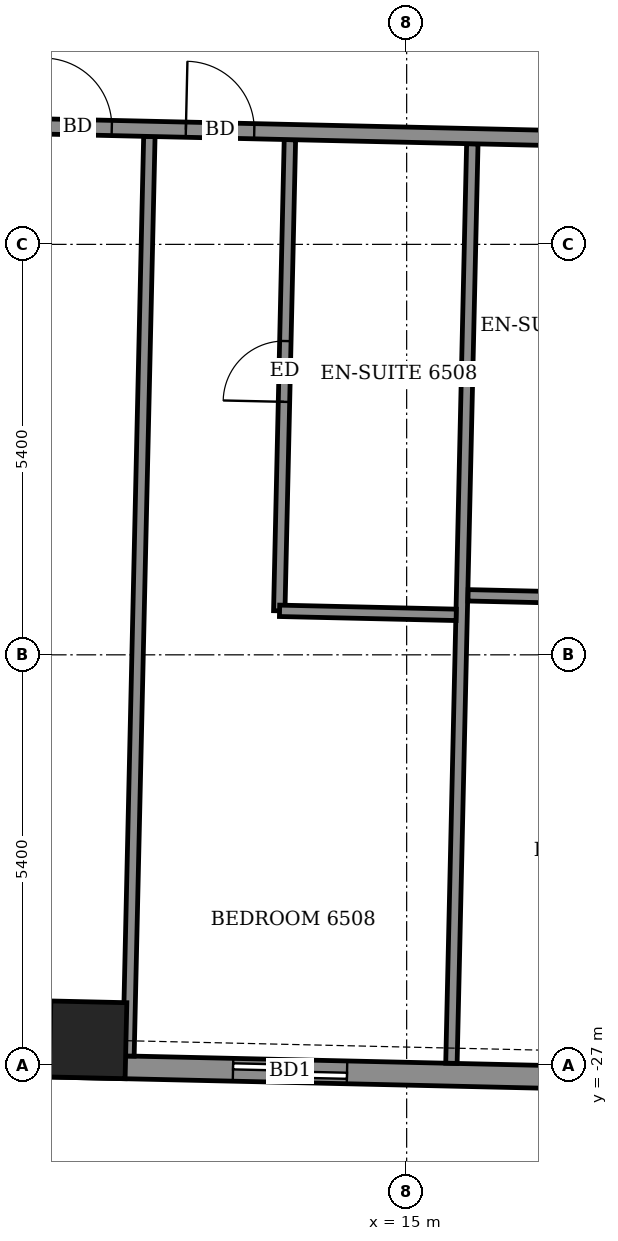
"""IFC4 building model, lengths in metres.
Left out: names, types, materials, properties, quantities, classifications, styles, units other than length and angle.
Written with IfcOpenShell. Run it as: python <this file> out.ifc"""

import sys

from ifc_helpers import new_model, si_unit, direction, frame, frame_2d, origin, origin_2d, place, context, subcontext, project, spatial, rectangle, extrude, element, fill, save


model = new_model("IFC4")
c1 = context("Model", 3, precision=1e-05, world=origin(), true_north=direction((0.0, 1.0)))
c2 = subcontext(c1, "Body", "Model", "MODEL_VIEW")
j1 = project(units=[si_unit("LENGTHUNIT", "METRE"), si_unit("PLANEANGLEUNIT", "RADIAN")], contexts=[c1])
p1 = place(None, origin())
s1 = spatial("IfcSite", under=j1, at=p1, CompositionType="ELEMENT")
p2 = place(p1, origin())
s2 = spatial("IfcBuilding", under=s1, at=p2, CompositionType="ELEMENT")
p3 = place(p2, frame((0.0, 0.0, 257.3)))
s3 = spatial("IfcBuildingStorey", under=s2, at=p3, CompositionType="ELEMENT", Elevation=257.3)
p4 = place(p3, frame((10.807, -26.665, -0.55), z_axis=(0.0, 0.0, 1.0), x_axis=(0.999742139886, -0.022708010396, 0.0)))
e1 = element("IfcColumn", 1, at=p4, inside=s3, PredefinedType="COLUMN", context=c2, shape_type="SweptSolid", body=[
    extrude(rectangle(XDim=1.0, YDim=1.0, at=origin_2d()), origin(), (0.0, 0.0, 1.0), 3.6),
])
p5 = place(p3, frame((-22.95, -26.249, 0.0), z_axis=(0.0, 0.0, 1.0), x_axis=(0.999742196137, -0.022705533743, 0.0)))
e2 = element("IfcWall", 2, at=p5, inside=s3, PredefinedType="SOLIDWALL", context=c2, shape_type="SweptSolid", body=[
    extrude(rectangle(XDim=47.171, YDim=0.3, at=frame_2d((23.585, 0.0))), origin(), (0.0, 0.0, 1.0), 2.55),
])
p6 = place(p5, frame((1.676, 0.0, 0.0)))
e3 = element("IfcOpeningElement", 3, at=p6, cuts=e2, PredefinedType="OPENING", context=c2, shape_type="SweptSolid", body=[
    extrude(rectangle(XDim=1.5, YDim=2.4, at=frame_2d((0.75, 1.2))), frame((0.0, 0.16, 0.0), z_axis=(0.0, -1.0, 0.0), x_axis=(1.0, 0.0, 0.0)), (0.0, 0.0, 1.0), 0.32),
])
p7 = place(p5, frame((4.741, 0.0, 0.0)))
e4 = element("IfcOpeningElement", 4, at=p7, cuts=e2, PredefinedType="OPENING", context=c2, shape_type="SweptSolid", body=[
    extrude(rectangle(XDim=1.2, YDim=2.4, at=frame_2d((0.6, 1.2))), frame((0.0, 0.16, 0.0), z_axis=(0.0, -1.0, 0.0), x_axis=(1.0, 0.0, 0.0)), (0.0, 0.0, 1.0), 0.32),
])
p8 = place(p5, frame((9.9, 0.0, 0.0)))
e5 = element("IfcOpeningElement", 5, at=p8, cuts=e2, PredefinedType="OPENING", context=c2, shape_type="SweptSolid", body=[
    extrude(rectangle(XDim=1.5, YDim=2.4, at=frame_2d((0.75, 1.2))), frame((0.0, 0.16, 0.0), z_axis=(0.0, -1.0, 0.0), x_axis=(1.0, 0.0, 0.0)), (0.0, 0.0, 1.0), 0.32),
])
p9 = place(p5, frame((14.632, 0.0, 0.0)))
e6 = element("IfcOpeningElement", 6, at=p9, cuts=e2, PredefinedType="OPENING", context=c2, shape_type="SweptSolid", body=[
    extrude(rectangle(XDim=1.5, YDim=2.4, at=frame_2d((0.75, 1.2))), frame((0.0, 0.16, 0.0), z_axis=(0.0, -1.0, 0.0), x_axis=(1.0, 0.0, 0.0)), (0.0, 0.0, 1.0), 0.32),
])
p10 = place(p5, frame((17.773, 0.0, 0.0)))
e7 = element("IfcOpeningElement", 7, at=p10, cuts=e2, PredefinedType="OPENING", context=c2, shape_type="SweptSolid", body=[
    extrude(rectangle(XDim=1.5, YDim=2.4, at=frame_2d((0.75, 1.2))), frame((0.0, 0.16, 0.0), z_axis=(0.0, -1.0, 0.0), x_axis=(1.0, 0.0, 0.0)), (0.0, 0.0, 1.0), 0.32),
])
p11 = place(p5, frame((22.825, 0.0, 0.0)))
e8 = element("IfcOpeningElement", 8, at=p11, cuts=e2, PredefinedType="OPENING", context=c2, shape_type="SweptSolid", body=[
    extrude(rectangle(XDim=1.5, YDim=2.4, at=frame_2d((0.75, 1.2))), frame((0.0, 0.16, 0.0), z_axis=(0.0, -1.0, 0.0), x_axis=(1.0, 0.0, 0.0)), (0.0, 0.0, 1.0), 0.32),
])
p12 = place(p5, frame((27.863, 0.0, 0.0)))
e9 = element("IfcOpeningElement", 9, at=p12, cuts=e2, PredefinedType="OPENING", context=c2, shape_type="SweptSolid", body=[
    extrude(rectangle(XDim=1.5, YDim=2.4, at=frame_2d((0.75, 1.2))), frame((0.0, 0.16, 0.0), z_axis=(0.0, -1.0, 0.0), x_axis=(1.0, 0.0, 0.0)), (0.0, 0.0, 1.0), 0.32),
])
p13 = place(p5, frame((31.004, 0.0, 0.0)))
e10 = element("IfcOpeningElement", 10, at=p13, cuts=e2, PredefinedType="OPENING", context=c2, shape_type="SweptSolid", body=[
    extrude(rectangle(XDim=1.5, YDim=2.4, at=frame_2d((0.75, 1.2))), frame((0.0, 0.16, 0.0), z_axis=(0.0, -1.0, 0.0), x_axis=(1.0, 0.0, 0.0)), (0.0, 0.0, 1.0), 0.32),
])
p14 = place(p5, frame((35.675, 0.0, 0.0)))
e11 = element("IfcOpeningElement", 11, at=p14, cuts=e2, PredefinedType="OPENING", context=c2, shape_type="SweptSolid", body=[
    extrude(rectangle(XDim=1.5, YDim=2.4, at=frame_2d((0.75, 1.2))), frame((0.0, 0.16, 0.0), z_axis=(0.0, -1.0, 0.0), x_axis=(1.0, 0.0, 0.0)), (0.0, 0.0, 1.0), 0.32),
])
p15 = place(p5, frame((41.17, 0.0, 0.0)))
e12 = element("IfcOpeningElement", 12, at=p15, cuts=e2, PredefinedType="OPENING", context=c2, shape_type="SweptSolid", body=[
    extrude(rectangle(XDim=1.2, YDim=2.4, at=frame_2d((0.6, 1.2))), frame((0.0, 0.16, 0.0), z_axis=(0.0, -1.0, 0.0), x_axis=(1.0, 0.0, 0.0)), (0.0, 0.0, 1.0), 0.32),
])
p16 = place(p5, frame((43.438, 0.0, 0.9)))
e13 = element("IfcOpeningElement", 13, at=p16, cuts=e2, PredefinedType="OPENING", context=c2, shape_type="SweptSolid", body=[
    extrude(rectangle(XDim=2.4, YDim=1.5, at=frame_2d((1.2, 0.75))), frame((0.0, 0.16, 0.0), z_axis=(0.0, -1.0, 0.0), x_axis=(1.0, 0.0, 0.0)), (0.0, 0.0, 1.0), 0.32),
])
p17 = place(p3, frame((11.34, -26.878, 0.0), z_axis=(0.0, 0.0, 1.0), x_axis=(0.022719113715, 0.999741887625, 0.0)))
e14 = element("IfcWall", 14, at=p17, inside=s3, PredefinedType="PARTITIONING", context=c2, shape_type="SweptSolid", body=[
    extrude(rectangle(XDim=12.1, YDim=0.15, at=frame_2d((6.05, 0.0))), origin(), (0.0, 0.0, 1.0), 2.55),
])
p18 = place(p3, frame((15.589, -26.974, 0.0), z_axis=(0.0, 0.0, 1.0), x_axis=(0.022718655443, 0.999741898039, 0.0)))
e15 = element("IfcWall", 15, at=p18, inside=s3, PredefinedType="PARTITIONING", context=c2, shape_type="SweptSolid", body=[
    extrude(rectangle(XDim=12.1, YDim=0.15, at=frame_2d((6.05, 0.0))), origin(), (0.0, 0.0, 1.0), 2.55),
])
p19 = place(p3, frame((13.324, -21.021, 0.0), z_axis=(0.0, 0.0, 1.0), x_axis=(0.022604220207, 0.999744491972, 0.0)))
e16 = element("IfcWall", 16, at=p19, inside=s3, PredefinedType="PARTITIONING", context=c2, shape_type="SweptSolid", body=[
    extrude(rectangle(XDim=6.199, YDim=0.15, at=frame_2d((3.1, 0.0))), origin(), (0.0, 0.0, 1.0), 3.05),
])
p20 = place(p19, frame((2.75, 0.0, 0.0)))
e17 = element("IfcOpeningElement", 17, at=p20, cuts=e16, PredefinedType="OPENING", context=c2, shape_type="SweptSolid", body=[
    extrude(rectangle(XDim=0.8, YDim=2.1, at=frame_2d((0.4, 1.05))), frame((0.0, 0.085, 0.0), z_axis=(0.0, -1.0, 0.0), x_axis=(1.0, 0.0, 0.0)), (0.0, 0.0, 1.0), 0.17),
])
p21 = place(p3, frame((13.328, -21.021, 0.0), z_axis=(0.0, 0.0, 1.0), x_axis=(0.99974031529, -0.022788198363, 0.0)))
e18 = element("IfcWall", 18, at=p21, inside=s3, PredefinedType="PARTITIONING", context=c2, shape_type="SweptSolid", body=[
    extrude(rectangle(XDim=2.325, YDim=0.15, at=frame_2d((1.162, 0.0))), origin(), (0.0, 0.0, 1.0), 3.05),
])
p22 = place(p3, frame((15.808, -20.817, 0.0), z_axis=(0.0, 0.0, 1.0), x_axis=(0.999737862264, -0.022895561926, 0.0)))
e19 = element("IfcWall", 19, at=p22, inside=s3, PredefinedType="PARTITIONING", context=c2, shape_type="SweptSolid", body=[
    extrude(rectangle(XDim=2.324, YDim=0.15, at=frame_2d((1.162, 0.0))), origin(), (0.0, 0.0, 1.0), 3.05),
])
p23 = place(p3, frame((-25.12, -13.847, 0.0), z_axis=(0.0, 0.0, 1.0), x_axis=(0.999742852445, -0.022676617578, 0.0)))
e20 = element("IfcWall", 20, at=p23, inside=s3, PredefinedType="PARTITIONING", context=c2, shape_type="SweptSolid", body=[
    extrude(rectangle(XDim=52.873, YDim=0.2, at=frame_2d((26.437, 0.0))), origin(), (0.0, 0.0, 1.0), 3.05),
])
p24 = place(p23, frame((0.725, 0.0, 0.0)))
e21 = element("IfcOpeningElement", 21, at=p24, cuts=e20, PredefinedType="OPENING", context=c2, shape_type="SweptSolid", body=[
    extrude(rectangle(XDim=1.0, YDim=2.1, at=frame_2d((0.5, 1.05))), frame((0.0, 0.11, 0.0), z_axis=(0.0, -1.0, 0.0), x_axis=(1.0, 0.0, 0.0)), (0.0, 0.0, 1.0), 0.22),
])
p25 = place(p23, frame((5.1, 0.0, 0.0)))
e22 = element("IfcOpeningElement", 22, at=p25, cuts=e20, PredefinedType="OPENING", context=c2, shape_type="SweptSolid", body=[
    extrude(rectangle(XDim=0.9, YDim=2.1, at=frame_2d((0.45, 1.05))), frame((0.0, 0.11, 0.0), z_axis=(0.0, -1.0, 0.0), x_axis=(1.0, 0.0, 0.0)), (0.0, 0.0, 1.0), 0.22),
])
p26 = place(p23, frame((9.6, 0.0, 0.0)))
e23 = element("IfcOpeningElement", 23, at=p26, cuts=e20, PredefinedType="OPENING", context=c2, shape_type="SweptSolid", body=[
    extrude(rectangle(XDim=0.9, YDim=2.1, at=frame_2d((0.45, 1.05))), frame((0.0, 0.11, 0.0), z_axis=(0.0, -1.0, 0.0), x_axis=(1.0, 0.0, 0.0)), (0.0, 0.0, 1.0), 0.22),
])
p27 = place(p23, frame((11.45, 0.0, 0.0)))
e24 = element("IfcOpeningElement", 24, at=p27, cuts=e20, PredefinedType="OPENING", context=c2, shape_type="SweptSolid", body=[
    extrude(rectangle(XDim=0.9, YDim=2.1, at=frame_2d((0.45, 1.05))), frame((0.0, 0.11, 0.0), z_axis=(0.0, -1.0, 0.0), x_axis=(1.0, 0.0, 0.0)), (0.0, 0.0, 1.0), 0.22),
])
p28 = place(p23, frame((18.15, 0.0, 0.0)))
e25 = element("IfcOpeningElement", 25, at=p28, cuts=e20, PredefinedType="OPENING", context=c2, shape_type="SweptSolid", body=[
    extrude(rectangle(XDim=0.9, YDim=2.1, at=frame_2d((0.45, 1.05))), frame((0.0, 0.11, 0.0), z_axis=(0.0, -1.0, 0.0), x_axis=(1.0, 0.0, 0.0)), (0.0, 0.0, 1.0), 0.22),
])
p29 = place(p23, frame((20.05, 0.0, 0.0)))
e26 = element("IfcOpeningElement", 26, at=p29, cuts=e20, PredefinedType="OPENING", context=c2, shape_type="SweptSolid", body=[
    extrude(rectangle(XDim=0.9, YDim=2.1, at=frame_2d((0.45, 1.05))), frame((0.0, 0.11, 0.0), z_axis=(0.0, -1.0, 0.0), x_axis=(1.0, 0.0, 0.0)), (0.0, 0.0, 1.0), 0.22),
])
p30 = place(p23, frame((26.775, 0.0, 0.0)))
e27 = element("IfcOpeningElement", 27, at=p30, cuts=e20, PredefinedType="OPENING", context=c2, shape_type="SweptSolid", body=[
    extrude(rectangle(XDim=0.9, YDim=2.1, at=frame_2d((0.45, 1.05))), frame((0.0, 0.11, 0.0), z_axis=(0.0, -1.0, 0.0), x_axis=(1.0, 0.0, 0.0)), (0.0, 0.0, 1.0), 0.22),
])
p31 = place(p23, frame((28.675, 0.0, 0.0)))
e28 = element("IfcOpeningElement", 28, at=p31, cuts=e20, PredefinedType="OPENING", context=c2, shape_type="SweptSolid", body=[
    extrude(rectangle(XDim=0.9, YDim=2.1, at=frame_2d((0.45, 1.05))), frame((0.0, 0.11, 0.0), z_axis=(0.0, -1.0, 0.0), x_axis=(1.0, 0.0, 0.0)), (0.0, 0.0, 1.0), 0.22),
])
p32 = place(p23, frame((35.35, 0.0, 0.0)))
e29 = element("IfcOpeningElement", 29, at=p32, cuts=e20, PredefinedType="OPENING", context=c2, shape_type="SweptSolid", body=[
    extrude(rectangle(XDim=0.9, YDim=2.1, at=frame_2d((0.45, 1.05))), frame((0.0, 0.11, 0.0), z_axis=(0.0, -1.0, 0.0), x_axis=(1.0, 0.0, 0.0)), (0.0, 0.0, 1.0), 0.22),
])
p33 = place(p23, frame((37.225, 0.0, 0.0)))
e30 = element("IfcOpeningElement", 30, at=p33, cuts=e20, PredefinedType="OPENING", context=c2, shape_type="SweptSolid", body=[
    extrude(rectangle(XDim=0.9, YDim=2.1, at=frame_2d((0.45, 1.05))), frame((0.0, 0.11, 0.0), z_axis=(0.0, -1.0, 0.0), x_axis=(1.0, 0.0, 0.0)), (0.0, 0.0, 1.0), 0.22),
])
p34 = place(p23, frame((43.85, 0.0, 0.0)))
e31 = element("IfcOpeningElement", 31, at=p34, cuts=e20, PredefinedType="OPENING", context=c2, shape_type="SweptSolid", body=[
    extrude(rectangle(XDim=0.9, YDim=2.1, at=frame_2d((0.45, 1.05))), frame((0.0, 0.11, 0.0), z_axis=(0.0, -1.0, 0.0), x_axis=(1.0, 0.0, 0.0)), (0.0, 0.0, 1.0), 0.22),
])
p35 = place(p23, frame((50.786, 0.0, 0.0)))
e32 = element("IfcOpeningElement", 32, at=p35, cuts=e20, PredefinedType="OPENING", context=c2, shape_type="SweptSolid", body=[
    extrude(rectangle(XDim=1.0, YDim=2.1, at=frame_2d((0.5, 1.05))), frame((0.0, 0.11, 0.0), z_axis=(0.0, -1.0, 0.0), x_axis=(1.0, 0.0, 0.0)), (0.0, 0.0, 1.0), 0.22),
])
p36 = place(p23, frame((46.05, 0.0, 0.0)))
e33 = element("IfcOpeningElement", 33, at=p36, cuts=e20, PredefinedType="OPENING", context=c2, shape_type="SweptSolid", body=[
    extrude(rectangle(XDim=0.9, YDim=2.1, at=frame_2d((0.45, 1.05))), frame((0.0, 0.11, 0.0), z_axis=(0.0, -1.0, 0.0), x_axis=(1.0, 0.0, 0.0)), (0.0, 0.0, 1.0), 0.22),
])
p37 = place(p14, origin())
e34 = element("IfcDoor", 34, at=p37, inside=s3, OperationType="SLIDING_TO_LEFT", PredefinedType="DOOR", context=c2, shape_type="SweptSolid", body=[
    extrude(rectangle(XDim=1.5, YDim=2.4, at=frame_2d((0.75, 1.2))), frame((0.0, 0.025, 0.0), z_axis=(0.0, -1.0, 0.0), x_axis=(1.0, 0.0, 0.0)), (0.0, 0.0, 1.0), 0.05),
])
fill(e11, e34)
p38 = place(p32, origin())
e35 = element("IfcDoor", 35, at=p38, inside=s3, OperationType="SINGLE_SWING_LEFT", PredefinedType="DOOR", context=c2, shape_type="SweptSolid", body=[
    extrude(rectangle(XDim=0.9, YDim=2.1, at=frame_2d((0.45, 1.05))), frame((0.0, 0.025, 0.0), z_axis=(0.0, -1.0, 0.0), x_axis=(1.0, 0.0, 0.0)), (0.0, 0.0, 1.0), 0.05),
])
fill(e29, e35)
p39 = place(p33, origin())
e36 = element("IfcDoor", 36, at=p39, inside=s3, OperationType="SINGLE_SWING_RIGHT", PredefinedType="DOOR", context=c2, shape_type="SweptSolid", body=[
    extrude(rectangle(XDim=0.9, YDim=2.1, at=frame_2d((0.45, 1.05))), frame((0.0, 0.025, 0.0), z_axis=(0.0, -1.0, 0.0), x_axis=(1.0, 0.0, 0.0)), (0.0, 0.0, 1.0), 0.05),
])
fill(e30, e36)
p40 = place(p20, origin())
e37 = element("IfcDoor", 37, at=p40, inside=s3, OperationType="SINGLE_SWING_RIGHT", PredefinedType="DOOR", context=c2, shape_type="SweptSolid", body=[
    extrude(rectangle(XDim=0.8, YDim=2.1, at=frame_2d((0.4, 1.05))), frame((0.0, 0.025, 0.0), z_axis=(0.0, -1.0, 0.0), x_axis=(1.0, 0.0, 0.0)), (0.0, 0.0, 1.0), 0.05),
])
fill(e17, e37)
save(model, sys.argv[1])
